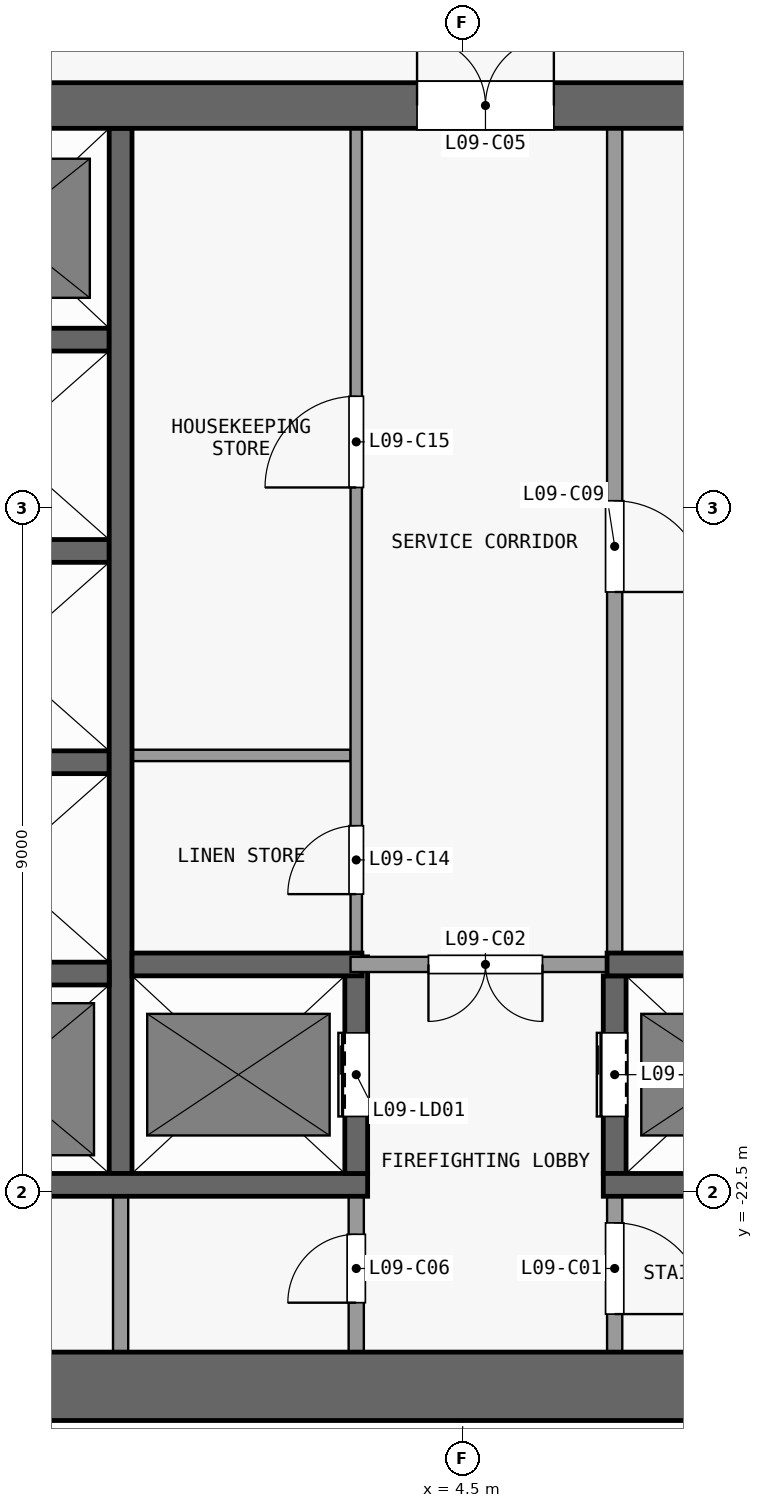
"""IFC4 building model, lengths in metres.
Left out: names, types, materials, properties, quantities, classifications, styles, units other than length and angle.
Written with IfcOpenShell. Run it as: python <this file> out.ifc"""

import sys

from ifc_helpers import new_model, si_unit, direction, frame, frame_2d, origin, place, context, subcontext, project, spatial, rectangle, extrude, element, fill, save


model = new_model("IFC4")
c1 = context("Model", 3, precision=1e-05, world=origin(), true_north=direction((0.0, 1.0)))
c2 = subcontext(c1, "Body", "Model", "MODEL_VIEW")
j1 = project(units=[si_unit("LENGTHUNIT", "METRE"), si_unit("PLANEANGLEUNIT", "RADIAN")], contexts=[c1])
p1 = place(None, origin())
s1 = spatial("IfcSite", under=j1, at=p1, CompositionType="ELEMENT")
p2 = place(p1, origin())
s2 = spatial("IfcBuilding", under=s1, at=p2, CompositionType="ELEMENT")
p3 = place(p2, frame((0.0, 0.0, 43.3)))
s3 = spatial("IfcBuildingStorey", under=s2, at=p3, CompositionType="ELEMENT", Elevation=43.3)
p4 = place(p3, frame((-13.5, -25.05, 0.0), z_axis=(0.0, 0.0, 1.0), x_axis=(1.0, 0.0, 0.0)))
e1 = element("IfcWall", 1, at=p4, inside=s3, PredefinedType="SHEAR", context=c2, shape_type="SweptSolid", body=[
    extrude(rectangle(XDim=27.0, YDim=0.9, at=frame_2d((13.5, 0.0))), origin(), (0.0, 0.0, 1.0), 3.3),
])
p5 = place(p3, frame((-13.5, -8.2, 0.0), z_axis=(0.0, 0.0, 1.0), x_axis=(1.0, 0.0, 0.0)))
e2 = element("IfcWall", 2, at=p5, inside=s3, PredefinedType="SHEAR", context=c2, shape_type="SweptSolid", body=[
    extrude(rectangle(XDim=27.0, YDim=0.6, at=frame_2d((13.5, 0.0))), origin(), (0.0, 0.0, 1.0), 3.3),
])
p6 = place(p5, frame((7.8, 0.0, 0.0)))
e3 = element("IfcOpeningElement", 3, at=p6, cuts=e2, PredefinedType="OPENING", context=c2, shape_type="SweptSolid", body=[
    extrude(rectangle(XDim=1.8, YDim=2.1, at=frame_2d((0.9, 1.05))), frame((0.0, 0.31, 0.0), z_axis=(0.0, -1.0, 0.0), x_axis=(1.0, 0.0, 0.0)), (0.0, 0.0, 1.0), 0.62),
])
p7 = place(p5, frame((17.4, 0.0, 0.0)))
e4 = element("IfcOpeningElement", 4, at=p7, cuts=e2, PredefinedType="OPENING", context=c2, shape_type="SweptSolid", body=[
    extrude(rectangle(XDim=1.8, YDim=2.1, at=frame_2d((0.9, 1.05))), frame((0.0, 0.31, 0.0), z_axis=(0.0, -1.0, 0.0), x_axis=(1.0, 0.0, 0.0)), (0.0, 0.0, 1.0), 0.62),
])
p8 = place(p5, frame((2.725, 0.0, 0.0)))
e5 = element("IfcOpeningElement", 5, at=p8, cuts=e2, PredefinedType="OPENING", context=c2, shape_type="SweptSolid", body=[
    extrude(rectangle(XDim=0.9, YDim=2.1, at=frame_2d((0.45, 1.05))), frame((0.0, 0.31, 0.0), z_axis=(0.0, -1.0, 0.0), x_axis=(1.0, 0.0, 0.0)), (0.0, 0.0, 1.0), 0.62),
])
p9 = place(p5, frame((23.375, 0.0, 0.0)))
e6 = element("IfcOpeningElement", 6, at=p9, cuts=e2, PredefinedType="OPENING", context=c2, shape_type="SweptSolid", body=[
    extrude(rectangle(XDim=0.9, YDim=2.1, at=frame_2d((0.45, 1.05))), frame((0.0, 0.31, 0.0), z_axis=(0.0, -1.0, 0.0), x_axis=(1.0, 0.0, 0.0)), (0.0, 0.0, 1.0), 0.62),
])
p10 = place(p3, frame((-2.95, -22.4, 0.0), z_axis=(0.0, 0.0, 1.0), x_axis=(1.0, 0.0, 0.0)))
e7 = element("IfcWall", 7, at=p10, inside=s3, PredefinedType="SHEAR", context=c2, shape_type="SweptSolid", body=[
    extrude(rectangle(XDim=6.2, YDim=0.3, at=frame_2d((3.1, 0.0))), origin(), (0.0, 0.0, 1.0), 3.3),
])
p11 = place(p3, frame((6.35, -22.4, 0.0), z_axis=(0.0, 0.0, 1.0), x_axis=(1.0, 0.0, 0.0)))
e8 = element("IfcWall", 8, at=p11, inside=s3, PredefinedType="SHEAR", context=c2, shape_type="SweptSolid", body=[
    extrude(rectangle(XDim=3.1, YDim=0.3, at=frame_2d((1.55, 0.0))), origin(), (0.0, 0.0, 1.0), 3.3),
])
p12 = place(p3, frame((-2.95, -19.62, 0.0), z_axis=(0.0, 0.0, 1.0), x_axis=(1.0, 0.0, 0.0)))
e9 = element("IfcWall", 9, at=p12, inside=s3, PredefinedType="SHEAR", context=c2, shape_type="SweptSolid", body=[
    extrude(rectangle(XDim=2.8, YDim=0.3, at=frame_2d((1.4, 0.0))), origin(), (0.0, 0.0, 1.0), 3.3),
])
p13 = place(p3, frame((0.15, -19.5, 0.0), z_axis=(0.0, 0.0, 1.0), x_axis=(1.0, 0.0, 0.0)))
e10 = element("IfcWall", 10, at=p13, inside=s3, PredefinedType="SHEAR", context=c2, shape_type="SweptSolid", body=[
    extrude(rectangle(XDim=3.025, YDim=0.3, at=frame_2d((1.513, 0.0))), origin(), (0.0, 0.0, 1.0), 3.3),
])
p14 = place(p3, frame((6.4, -19.5, 0.0), z_axis=(0.0, 0.0, 1.0), x_axis=(-1.0, 0.0, 0.0)))
e11 = element("IfcWall", 11, at=p14, inside=s3, PredefinedType="PARTITIONING", context=c2, shape_type="SweptSolid", body=[
    extrude(rectangle(XDim=3.375, YDim=0.2, at=frame_2d((1.688, 0.0))), origin(), (0.0, 0.0, 1.0), 3.3),
])
p15 = place(p14, frame((0.85, 0.0, 0.0)))
e12 = element("IfcOpeningElement", 12, at=p15, cuts=e11, PredefinedType="OPENING", context=c2, shape_type="SweptSolid", body=[
    extrude(rectangle(XDim=1.5, YDim=2.1, at=frame_2d((0.75, 1.05))), frame((0.0, 0.11, 0.0), z_axis=(0.0, -1.0, 0.0), x_axis=(1.0, 0.0, 0.0)), (0.0, 0.0, 1.0), 0.22),
])
p16 = place(p3, frame((6.4, -19.5, 0.0), z_axis=(0.0, 0.0, 1.0), x_axis=(1.0, 0.0, 0.0)))
e13 = element("IfcWall", 13, at=p16, inside=s3, PredefinedType="SHEAR", context=c2, shape_type="SweptSolid", body=[
    extrude(rectangle(XDim=3.05, YDim=0.3, at=frame_2d((1.525, 0.0))), origin(), (0.0, 0.0, 1.0), 3.3),
])
p17 = place(p3, frame((-2.95, -16.84, 0.0), z_axis=(0.0, 0.0, 1.0), x_axis=(1.0, 0.0, 0.0)))
e14 = element("IfcWall", 14, at=p17, inside=s3, PredefinedType="SHEAR", context=c2, shape_type="SweptSolid", body=[
    extrude(rectangle(XDim=2.8, YDim=0.3, at=frame_2d((1.4, 0.0))), origin(), (0.0, 0.0, 1.0), 3.3),
])
p18 = place(p3, frame((0.15, -16.75, 0.0), z_axis=(0.0, 0.0, 1.0), x_axis=(1.0, 0.0, 0.0)))
e15 = element("IfcWall", 15, at=p18, inside=s3, PredefinedType="PARTITIONING", context=c2, shape_type="SweptSolid", body=[
    extrude(rectangle(XDim=2.875, YDim=0.15, at=frame_2d((1.438, 0.0))), origin(), (0.0, 0.0, 1.0), 3.3),
])
for number, where, z_axis, x_axis in (
    (16, (-2.95, -14.06, 0.0), (0.0, 0.0, 1.0), (1.0, 0.0, 0.0)),
    (17, (-2.95, -11.28, 0.0), (0.0, 0.0, 1.0), (1.0, 0.0, 0.0)),
):
    element("IfcWall", number, at=place(p3, frame(where, z_axis=z_axis, x_axis=x_axis)), inside=s3, PredefinedType="SHEAR", context=c2, shape_type="SweptSolid", body=[
        extrude(rectangle(XDim=2.8, YDim=0.3, at=frame_2d((1.4, 0.0))), origin(), (0.0, 0.0, 1.0), 3.3),
    ])
p19 = place(p3, frame((0.0, -24.6, 0.0), z_axis=(0.0, 0.0, 1.0), x_axis=(0.0, 1.0, 0.0)))
e18 = element("IfcWall", 18, at=p19, inside=s3, PredefinedType="PARTITIONING", context=c2, shape_type="SweptSolid", body=[
    extrude(rectangle(XDim=2.05, YDim=0.2, at=frame_2d((1.025, 0.0))), origin(), (0.0, 0.0, 1.0), 3.3),
])
p20 = place(p3, frame((0.0, -22.25, 0.0), z_axis=(0.0, 0.0, 1.0), x_axis=(0.0, 1.0, 0.0)))
e19 = element("IfcWall", 19, at=p20, inside=s3, PredefinedType="SHEAR", context=c2, shape_type="SweptSolid", body=[
    extrude(rectangle(XDim=13.75, YDim=0.3, at=frame_2d((6.875, 0.0))), origin(), (0.0, 0.0, 1.0), 3.3),
])
p21 = place(p3, frame((3.1, -24.6, 0.0), z_axis=(0.0, 0.0, 1.0), x_axis=(0.0, 1.0, 0.0)))
e20 = element("IfcWall", 20, at=p21, inside=s3, PredefinedType="PARTITIONING", context=c2, shape_type="SweptSolid", body=[
    extrude(rectangle(XDim=2.05, YDim=0.2, at=frame_2d((1.025, 0.0))), origin(), (0.0, 0.0, 1.0), 3.3),
])
p22 = place(p21, frame((0.65, 0.0, 0.0)))
e21 = element("IfcOpeningElement", 21, at=p22, cuts=e20, PredefinedType="OPENING", context=c2, shape_type="SweptSolid", body=[
    extrude(rectangle(XDim=0.9, YDim=2.1, at=frame_2d((0.45, 1.05))), frame((0.0, 0.11, 0.0), z_axis=(0.0, -1.0, 0.0), x_axis=(1.0, 0.0, 0.0)), (0.0, 0.0, 1.0), 0.22),
])
p23 = place(p3, frame((3.1, -22.25, 0.0), z_axis=(0.0, 0.0, 1.0), x_axis=(0.0, 1.0, 0.0)))
e22 = element("IfcWall", 22, at=p23, inside=s3, PredefinedType="SHEAR", context=c2, shape_type="SweptSolid", body=[
    extrude(rectangle(XDim=2.85, YDim=0.3, at=frame_2d((1.425, 0.0))), origin(), (0.0, 0.0, 1.0), 3.3),
])
p24 = place(p23, frame((0.75, 0.0, 0.0)))
e23 = element("IfcOpeningElement", 23, at=p24, cuts=e22, PredefinedType="OPENING", context=c2, shape_type="SweptSolid", body=[
    extrude(rectangle(XDim=1.1, YDim=2.1, at=frame_2d((0.55, 1.05))), frame((0.0, 0.16, 0.0), z_axis=(0.0, -1.0, 0.0), x_axis=(1.0, 0.0, 0.0)), (0.0, 0.0, 1.0), 0.32),
])
p25 = place(p3, frame((3.1, -19.4, 0.0), z_axis=(0.0, 0.0, 1.0), x_axis=(0.0, 1.0, 0.0)))
e24 = element("IfcWall", 24, at=p25, inside=s3, PredefinedType="PARTITIONING", context=c2, shape_type="SweptSolid", body=[
    extrude(rectangle(XDim=10.9, YDim=0.15, at=frame_2d((5.45, 0.0))), origin(), (0.0, 0.0, 1.0), 3.3),
])
p26 = place(p25, frame((0.825, 0.0, 0.0)))
e25 = element("IfcOpeningElement", 25, at=p26, cuts=e24, PredefinedType="OPENING", context=c2, shape_type="SweptSolid", body=[
    extrude(rectangle(XDim=0.9, YDim=2.1, at=frame_2d((0.45, 1.05))), frame((0.0, 0.085, 0.0), z_axis=(0.0, -1.0, 0.0), x_axis=(1.0, 0.0, 0.0)), (0.0, 0.0, 1.0), 0.17),
])
p27 = place(p25, frame((6.175, 0.0, 0.0)))
e26 = element("IfcOpeningElement", 26, at=p27, cuts=e24, PredefinedType="OPENING", context=c2, shape_type="SweptSolid", body=[
    extrude(rectangle(XDim=1.2, YDim=2.1, at=frame_2d((0.6, 1.05))), frame((0.0, 0.085, 0.0), z_axis=(0.0, -1.0, 0.0), x_axis=(1.0, 0.0, 0.0)), (0.0, 0.0, 1.0), 0.17),
])
p28 = place(p3, frame((6.5, -22.55, 0.0), z_axis=(0.0, 0.0, 1.0), x_axis=(0.0, -1.0, 0.0)))
e27 = element("IfcWall", 27, at=p28, inside=s3, PredefinedType="PARTITIONING", context=c2, shape_type="SweptSolid", body=[
    extrude(rectangle(XDim=2.05, YDim=0.2, at=frame_2d((1.025, 0.0))), origin(), (0.0, 0.0, 1.0), 3.3),
])
p29 = place(p28, frame((0.35, 0.0, 0.0)))
e28 = element("IfcOpeningElement", 28, at=p29, cuts=e27, PredefinedType="OPENING", context=c2, shape_type="SweptSolid", body=[
    extrude(rectangle(XDim=1.2, YDim=2.1, at=frame_2d((0.6, 1.05))), frame((0.0, 0.11, 0.0), z_axis=(0.0, -1.0, 0.0), x_axis=(1.0, 0.0, 0.0)), (0.0, 0.0, 1.0), 0.22),
])
p30 = place(p3, frame((6.5, -22.25, 0.0), z_axis=(0.0, 0.0, 1.0), x_axis=(0.0, 1.0, 0.0)))
e29 = element("IfcWall", 29, at=p30, inside=s3, PredefinedType="SHEAR", context=c2, shape_type="SweptSolid", body=[
    extrude(rectangle(XDim=2.6, YDim=0.3, at=frame_2d((1.3, 0.0))), origin(), (0.0, 0.0, 1.0), 3.3),
])
p31 = place(p30, frame((0.75, 0.0, 0.0)))
e30 = element("IfcOpeningElement", 30, at=p31, cuts=e29, PredefinedType="OPENING", context=c2, shape_type="SweptSolid", body=[
    extrude(rectangle(XDim=1.1, YDim=2.1, at=frame_2d((0.55, 1.05))), frame((0.0, 0.16, 0.0), z_axis=(0.0, -1.0, 0.0), x_axis=(1.0, 0.0, 0.0)), (0.0, 0.0, 1.0), 0.32),
])
p32 = place(p3, frame((6.5, -8.5, 0.0), z_axis=(0.0, 0.0, 1.0), x_axis=(0.0, -1.0, 0.0)))
e31 = element("IfcWall", 31, at=p32, inside=s3, PredefinedType="PARTITIONING", context=c2, shape_type="SweptSolid", body=[
    extrude(rectangle(XDim=10.85, YDim=0.2, at=frame_2d((5.425, 0.0))), origin(), (0.0, 0.0, 1.0), 3.3),
])
p33 = place(p32, frame((4.9, 0.0, 0.0)))
e32 = element("IfcOpeningElement", 32, at=p33, cuts=e31, PredefinedType="OPENING", context=c2, shape_type="SweptSolid", body=[
    extrude(rectangle(XDim=1.2, YDim=2.1, at=frame_2d((0.6, 1.05))), frame((0.0, 0.11, 0.0), z_axis=(0.0, -1.0, 0.0), x_axis=(1.0, 0.0, 0.0)), (0.0, 0.0, 1.0), 0.22),
])
p34 = place(p24, origin())
e33 = element("IfcDoor", 33, at=p34, inside=s3, OperationType="DOUBLE_DOOR_SLIDING", PredefinedType="DOOR", context=c2, shape_type="SweptSolid", body=[
    extrude(rectangle(XDim=1.1, YDim=2.1, at=frame_2d((0.55, 1.05))), frame((0.0, 0.025, 0.0), z_axis=(0.0, -1.0, 0.0), x_axis=(1.0, 0.0, 0.0)), (0.0, 0.0, 1.0), 0.05),
])
fill(e23, e33)
p35 = place(p31, origin())
e34 = element("IfcDoor", 34, at=p35, inside=s3, OperationType="DOUBLE_DOOR_SLIDING", PredefinedType="DOOR", context=c2, shape_type="SweptSolid", body=[
    extrude(rectangle(XDim=1.1, YDim=2.1, at=frame_2d((0.55, 1.05))), frame((0.0, 0.025, 0.0), z_axis=(0.0, -1.0, 0.0), x_axis=(1.0, 0.0, 0.0)), (0.0, 0.0, 1.0), 0.05),
])
fill(e30, e34)
p36 = place(p29, origin())
e35 = element("IfcDoor", 35, at=p36, inside=s3, OperationType="SINGLE_SWING_RIGHT", PredefinedType="DOOR", context=c2, shape_type="SweptSolid", body=[
    extrude(rectangle(XDim=1.2, YDim=2.1, at=frame_2d((0.6, 1.05))), frame((0.0, 0.025, 0.0), z_axis=(0.0, -1.0, 0.0), x_axis=(1.0, 0.0, 0.0)), (0.0, 0.0, 1.0), 0.05),
])
fill(e28, e35)
p37 = place(p15, origin())
e36 = element("IfcDoor", 36, at=p37, inside=s3, OperationType="DOUBLE_DOOR_SINGLE_SWING", PredefinedType="DOOR", context=c2, shape_type="SweptSolid", body=[
    extrude(rectangle(XDim=1.5, YDim=2.1, at=frame_2d((0.75, 1.05))), frame((0.0, 0.025, 0.0), z_axis=(0.0, -1.0, 0.0), x_axis=(1.0, 0.0, 0.0)), (0.0, 0.0, 1.0), 0.05),
])
fill(e12, e36)
p38 = place(p7, origin())
e37 = element("IfcDoor", 37, at=p38, inside=s3, OperationType="DOUBLE_DOOR_SINGLE_SWING", PredefinedType="DOOR", context=c2, shape_type="SweptSolid", body=[
    extrude(rectangle(XDim=1.8, YDim=2.1, at=frame_2d((0.9, 1.05))), frame((0.0, 0.025, 0.0), z_axis=(0.0, -1.0, 0.0), x_axis=(1.0, 0.0, 0.0)), (0.0, 0.0, 1.0), 0.05),
])
fill(e4, e37)
p39 = place(p22, origin())
e38 = element("IfcDoor", 38, at=p39, inside=s3, OperationType="SINGLE_SWING_LEFT", PredefinedType="DOOR", context=c2, shape_type="SweptSolid", body=[
    extrude(rectangle(XDim=0.9, YDim=2.1, at=frame_2d((0.45, 1.05))), frame((0.0, 0.025, 0.0), z_axis=(0.0, -1.0, 0.0), x_axis=(1.0, 0.0, 0.0)), (0.0, 0.0, 1.0), 0.05),
])
fill(e21, e38)
p40 = place(p33, origin())
e39 = element("IfcDoor", 39, at=p40, inside=s3, OperationType="SINGLE_SWING_RIGHT", PredefinedType="DOOR", context=c2, shape_type="SweptSolid", body=[
    extrude(rectangle(XDim=1.2, YDim=2.1, at=frame_2d((0.6, 1.05))), frame((0.0, 0.025, 0.0), z_axis=(0.0, -1.0, 0.0), x_axis=(1.0, 0.0, 0.0)), (0.0, 0.0, 1.0), 0.05),
])
fill(e32, e39)
p41 = place(p26, origin())
e40 = element("IfcDoor", 40, at=p41, inside=s3, OperationType="SINGLE_SWING_LEFT", PredefinedType="DOOR", context=c2, shape_type="SweptSolid", body=[
    extrude(rectangle(XDim=0.9, YDim=2.1, at=frame_2d((0.45, 1.05))), frame((0.0, 0.025, 0.0), z_axis=(0.0, -1.0, 0.0), x_axis=(1.0, 0.0, 0.0)), (0.0, 0.0, 1.0), 0.05),
])
fill(e25, e40)
p42 = place(p27, origin())
e41 = element("IfcDoor", 41, at=p42, inside=s3, OperationType="SINGLE_SWING_LEFT", PredefinedType="DOOR", context=c2, shape_type="SweptSolid", body=[
    extrude(rectangle(XDim=1.2, YDim=2.1, at=frame_2d((0.6, 1.05))), frame((0.0, 0.025, 0.0), z_axis=(0.0, -1.0, 0.0), x_axis=(1.0, 0.0, 0.0)), (0.0, 0.0, 1.0), 0.05),
])
fill(e26, e41)
save(model, sys.argv[1])
